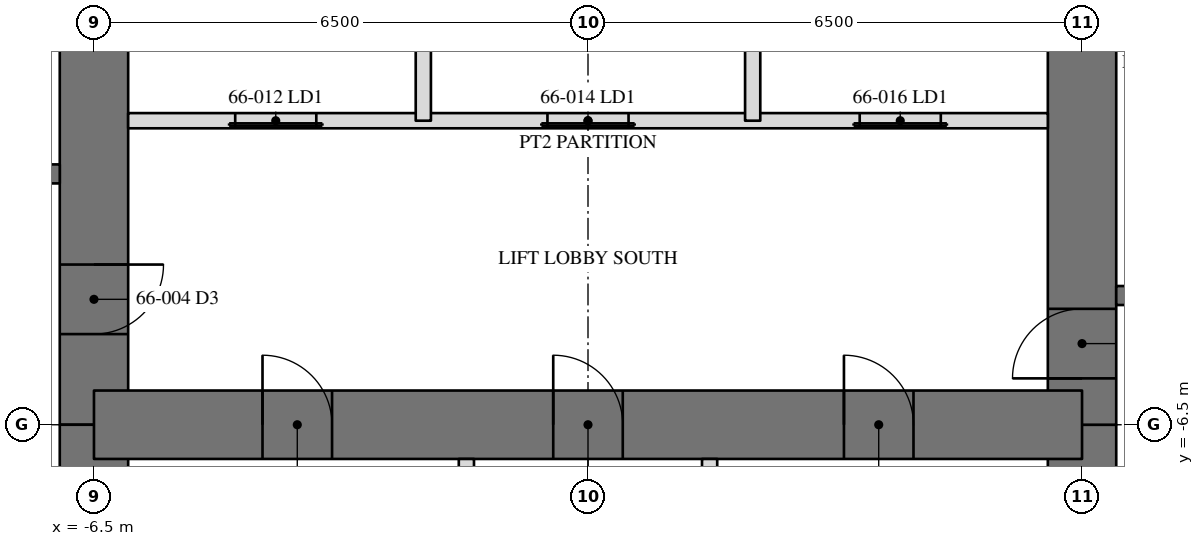
"""IFC4 building model, lengths in metres.
Left out: names, types, materials, properties, quantities, classifications, styles, units other than length and angle.
Written with IfcOpenShell. Run it as: python <this file> out.ifc"""

import sys

from ifc_helpers import new_model, si_unit, direction, frame, frame_2d, origin, place, context, subcontext, project, spatial, rectangle, extrude, element, fill, save


model = new_model("IFC4")
c1 = context("Model", 3, precision=1e-05, world=origin(), true_north=direction((0.0, 1.0)))
c2 = subcontext(c1, "Body", "Model", "MODEL_VIEW")
j1 = project(units=[si_unit("LENGTHUNIT", "METRE"), si_unit("PLANEANGLEUNIT", "RADIAN")], contexts=[c1])
p1 = place(None, origin())
s1 = spatial("IfcSite", under=j1, at=p1, CompositionType="ELEMENT")
p2 = place(p1, origin())
s2 = spatial("IfcBuilding", under=s1, at=p2, CompositionType="ELEMENT")
p3 = place(p2, frame((0.0, 0.0, 270.4)))
s3 = spatial("IfcBuildingStorey", under=s2, at=p3, CompositionType="ELEMENT", Elevation=270.4)
p4 = place(p3, frame((6.5, -11.0, 0.0), z_axis=(0.0, 0.0, 1.0), x_axis=(0.0, 1.0, 0.0)))
e1 = element("IfcWall", 1, at=p4, inside=s3, PredefinedType="SHEAR", context=c2, shape_type="SweptSolid", body=[
    extrude(rectangle(XDim=4.5, YDim=0.9, at=frame_2d((2.25, 0.0))), origin(), (0.0, 0.0, 1.0), 3.6),
])
p5 = place(p3, frame((6.5, -6.5, 0.0), z_axis=(0.0, 0.0, 1.0), x_axis=(0.0, 1.0, 0.0)))
e2 = element("IfcWall", 2, at=p5, inside=s3, PredefinedType="SHEAR", context=c2, shape_type="SweptSolid", body=[
    extrude(rectangle(XDim=13.0, YDim=0.9, at=frame_2d((6.5, 0.0))), origin(), (0.0, 0.0, 1.0), 3.6),
])
p6 = place(p5, frame((10.893, 0.0, 0.0)))
e3 = element("IfcOpeningElement", 3, at=p6, cuts=e2, PredefinedType="OPENING", context=c2, shape_type="SweptSolid", body=[
    extrude(rectangle(XDim=0.915, YDim=2.134, at=frame_2d((0.458, 1.067))), frame((0.0, 0.46, 0.0), z_axis=(0.0, -1.0, 0.0), x_axis=(1.0, 0.0, 0.0)), (0.0, 0.0, 1.0), 0.92),
])
p7 = place(p5, frame((0.61, 0.0, 0.0)))
e4 = element("IfcOpeningElement", 4, at=p7, cuts=e2, PredefinedType="OPENING", context=c2, shape_type="SweptSolid", body=[
    extrude(rectangle(XDim=0.915, YDim=2.134, at=frame_2d((0.458, 1.067))), frame((0.0, 0.46, 0.0), z_axis=(0.0, -1.0, 0.0), x_axis=(1.0, 0.0, 0.0)), (0.0, 0.0, 1.0), 0.92),
])
p8 = place(p3, frame((-6.5, 6.5, 0.0), z_axis=(0.0, 0.0, 1.0), x_axis=(0.0, -1.0, 0.0)))
e5 = element("IfcWall", 5, at=p8, inside=s3, PredefinedType="SHEAR", context=c2, shape_type="SweptSolid", body=[
    extrude(rectangle(XDim=13.0, YDim=0.9, at=frame_2d((6.5, 0.0))), origin(), (0.0, 0.0, 1.0), 3.6),
])
p9 = place(p8, frame((10.893, 0.0, 0.0)))
e6 = element("IfcOpeningElement", 6, at=p9, cuts=e5, PredefinedType="OPENING", context=c2, shape_type="SweptSolid", body=[
    extrude(rectangle(XDim=0.915, YDim=2.134, at=frame_2d((0.458, 1.067))), frame((0.0, 0.46, 0.0), z_axis=(0.0, -1.0, 0.0), x_axis=(1.0, 0.0, 0.0)), (0.0, 0.0, 1.0), 0.92),
])
p10 = place(p8, frame((0.61, 0.0, 0.0)))
e7 = element("IfcOpeningElement", 7, at=p10, cuts=e5, PredefinedType="OPENING", context=c2, shape_type="SweptSolid", body=[
    extrude(rectangle(XDim=0.915, YDim=2.134, at=frame_2d((0.458, 1.067))), frame((0.0, 0.46, 0.0), z_axis=(0.0, -1.0, 0.0), x_axis=(1.0, 0.0, 0.0)), (0.0, 0.0, 1.0), 0.92),
])
p11 = place(p3, frame((-6.5, -6.5, 0.0), z_axis=(0.0, 0.0, 1.0), x_axis=(0.0, -1.0, 0.0)))
e8 = element("IfcWall", 8, at=p11, inside=s3, PredefinedType="SHEAR", context=c2, shape_type="SweptSolid", body=[
    extrude(rectangle(XDim=4.5, YDim=0.9, at=frame_2d((2.25, 0.0))), origin(), (0.0, 0.0, 1.0), 3.6),
])
p12 = place(p3, frame((-6.5, -6.5, 0.0), z_axis=(0.0, 0.0, 1.0), x_axis=(1.0, 0.0, 0.0)))
e9 = element("IfcWall", 9, at=p12, inside=s3, PredefinedType="SHEAR", context=c2, shape_type="SweptSolid", body=[
    extrude(rectangle(XDim=13.0, YDim=0.9, at=frame_2d((6.5, 0.0))), origin(), (0.0, 0.0, 1.0), 3.6),
])
p13 = place(p12, frame((6.042, 0.0, 0.0)))
e10 = element("IfcOpeningElement", 10, at=p13, cuts=e9, PredefinedType="OPENING", context=c2, shape_type="SweptSolid", body=[
    extrude(rectangle(XDim=0.915, YDim=2.134, at=frame_2d((0.458, 1.067))), frame((0.0, 0.46, 0.0), z_axis=(0.0, -1.0, 0.0), x_axis=(1.0, 0.0, 0.0)), (0.0, 0.0, 1.0), 0.92),
])
p14 = place(p12, frame((2.218, 0.0, 0.0)))
e11 = element("IfcOpeningElement", 11, at=p14, cuts=e9, PredefinedType="OPENING", context=c2, shape_type="SweptSolid", body=[
    extrude(rectangle(XDim=0.915, YDim=2.134, at=frame_2d((0.458, 1.067))), frame((0.0, 0.46, 0.0), z_axis=(0.0, -1.0, 0.0), x_axis=(1.0, 0.0, 0.0)), (0.0, 0.0, 1.0), 0.92),
])
p15 = place(p12, frame((9.867, 0.0, 0.0)))
e12 = element("IfcOpeningElement", 12, at=p15, cuts=e9, PredefinedType="OPENING", context=c2, shape_type="SweptSolid", body=[
    extrude(rectangle(XDim=0.915, YDim=2.134, at=frame_2d((0.458, 1.067))), frame((0.0, 0.46, 0.0), z_axis=(0.0, -1.0, 0.0), x_axis=(1.0, 0.0, 0.0)), (0.0, 0.0, 1.0), 0.92),
])
p16 = place(p3, frame((6.95, -4.8, 0.0), z_axis=(0.0, 0.0, 1.0), x_axis=(1.0, 0.0, 0.0)))
e13 = element("IfcWall", 13, at=p16, inside=s3, PredefinedType="SOLIDWALL", context=c2, shape_type="SweptSolid", body=[
    extrude(rectangle(XDim=3.75, YDim=0.25, at=frame_2d((1.875, 0.0))), origin(), (0.0, 0.0, 1.0), 3.41),
])
p17 = place(p3, frame((-6.95, -3.2, 0.0), z_axis=(0.0, 0.0, 1.0), x_axis=(-1.0, 0.0, 0.0)))
e14 = element("IfcWall", 14, at=p17, inside=s3, PredefinedType="SOLIDWALL", context=c2, shape_type="SweptSolid", body=[
    extrude(rectangle(XDim=3.75, YDim=0.25, at=frame_2d((1.875, 0.0))), origin(), (0.0, 0.0, 1.0), 3.41),
])
p18 = place(p17, frame((1.342, 0.0, 0.0)))
e15 = element("IfcOpeningElement", 15, at=p18, cuts=e14, PredefinedType="OPENING", context=c2, shape_type="SweptSolid", body=[
    extrude(rectangle(XDim=1.067, YDim=2.134, at=frame_2d((0.533, 1.067))), frame((0.0, 0.135, 0.0), z_axis=(0.0, -1.0, 0.0), x_axis=(1.0, 0.0, 0.0)), (0.0, 0.0, 1.0), 0.27),
])
p19 = place(p3, frame((6.05, -2.5, 0.0), z_axis=(0.0, 0.0, 1.0), x_axis=(-1.0, 0.0, 0.0)))
e16 = element("IfcWall", 16, at=p19, inside=s3, PredefinedType="PARTITIONING", context=c2, shape_type="SweptSolid", body=[
    extrude(rectangle(XDim=12.1, YDim=0.2, at=frame_2d((6.05, 0.0))), origin(), (0.0, 0.0, 1.0), 3.41),
])
p20 = place(p19, frame((9.625, 0.0, 0.0)))
e17 = element("IfcOpeningElement", 17, at=p20, cuts=e16, PredefinedType="OPENING", context=c2, shape_type="SweptSolid", body=[
    extrude(rectangle(XDim=1.067, YDim=2.134, at=frame_2d((0.533, 1.067))), frame((0.0, 0.11, 0.0), z_axis=(0.0, -1.0, 0.0), x_axis=(1.0, 0.0, 0.0)), (0.0, 0.0, 1.0), 0.22),
])
p21 = place(p19, frame((5.517, 0.0, 0.0)))
e18 = element("IfcOpeningElement", 18, at=p21, cuts=e16, PredefinedType="OPENING", context=c2, shape_type="SweptSolid", body=[
    extrude(rectangle(XDim=1.067, YDim=2.134, at=frame_2d((0.533, 1.067))), frame((0.0, 0.11, 0.0), z_axis=(0.0, -1.0, 0.0), x_axis=(1.0, 0.0, 0.0)), (0.0, 0.0, 1.0), 0.22),
])
p22 = place(p19, frame((1.408, 0.0, 0.0)))
e19 = element("IfcOpeningElement", 19, at=p22, cuts=e16, PredefinedType="OPENING", context=c2, shape_type="SweptSolid", body=[
    extrude(rectangle(XDim=1.067, YDim=2.134, at=frame_2d((0.533, 1.067))), frame((0.0, 0.11, 0.0), z_axis=(0.0, -1.0, 0.0), x_axis=(1.0, 0.0, 0.0)), (0.0, 0.0, 1.0), 0.22),
])
for number, where, z_axis, x_axis in (
    (20, (-2.167, -2.5, 0.0), (0.0, 0.0, 1.0), (0.0, 1.0, 0.0)),
    (21, (2.167, -2.5, 0.0), (0.0, 0.0, 1.0), (0.0, 1.0, 0.0)),
):
    element("IfcWall", number, at=place(p3, frame(where, z_axis=z_axis, x_axis=x_axis)), inside=s3, PredefinedType="PARTITIONING", context=c2, shape_type="SweptSolid", body=[
        extrude(rectangle(XDim=5.0, YDim=0.2, at=frame_2d((2.5, 0.0))), origin(), (0.0, 0.0, 1.0), 3.41),
    ])
for number, where, z_axis, x_axis in (
    (22, (-1.6, -6.95, 0.0), (0.0, 0.0, 1.0), (0.0, -1.0, 0.0)),
    (23, (1.6, -6.95, 0.0), (0.0, 0.0, 1.0), (0.0, -1.0, 0.0)),
):
    element("IfcWall", number, at=place(p3, frame(where, z_axis=z_axis, x_axis=x_axis)), inside=s3, PredefinedType="PARTITIONING", context=c2, shape_type="SweptSolid", body=[
        extrude(rectangle(XDim=3.75, YDim=0.2, at=frame_2d((1.875, 0.0))), origin(), (0.0, 0.0, 1.0), 3.41),
    ])
p23 = place(p9, origin())
e24 = element("IfcDoor", 24, at=p23, inside=s3, OperationType="SINGLE_SWING_RIGHT", PredefinedType="DOOR", context=c2, shape_type="SweptSolid", body=[
    extrude(rectangle(XDim=0.915, YDim=2.134, at=frame_2d((0.458, 1.067))), frame((0.0, -0.375, 0.0), z_axis=(0.0, -1.0, 0.0), x_axis=(1.0, 0.0, 0.0)), (0.0, 0.0, 1.0), 0.05),
])
fill(e6, e24)
p24 = place(p7, origin())
e25 = element("IfcDoor", 25, at=p24, inside=s3, OperationType="SINGLE_SWING_RIGHT", PredefinedType="DOOR", context=c2, shape_type="SweptSolid", body=[
    extrude(rectangle(XDim=0.915, YDim=2.134, at=frame_2d((0.458, 1.067))), frame((0.0, -0.375, 0.0), z_axis=(0.0, -1.0, 0.0), x_axis=(1.0, 0.0, 0.0)), (0.0, 0.0, 1.0), 0.05),
])
fill(e4, e25)
p25 = place(p20, origin())
e26 = element("IfcDoor", 26, at=p25, inside=s3, OperationType="SLIDING_TO_LEFT", PredefinedType="DOOR", context=c2, shape_type="SweptSolid", body=[
    extrude(rectangle(XDim=1.067, YDim=2.134, at=frame_2d((0.533, 1.067))), frame((0.0, 0.025, 0.0), z_axis=(0.0, -1.0, 0.0), x_axis=(1.0, 0.0, 0.0)), (0.0, 0.0, 1.0), 0.05),
])
fill(e17, e26)
p26 = place(p21, origin())
e27 = element("IfcDoor", 27, at=p26, inside=s3, OperationType="SLIDING_TO_LEFT", PredefinedType="DOOR", context=c2, shape_type="SweptSolid", body=[
    extrude(rectangle(XDim=1.067, YDim=2.134, at=frame_2d((0.533, 1.067))), frame((0.0, 0.025, 0.0), z_axis=(0.0, -1.0, 0.0), x_axis=(1.0, 0.0, 0.0)), (0.0, 0.0, 1.0), 0.05),
])
fill(e18, e27)
p27 = place(p22, origin())
e28 = element("IfcDoor", 28, at=p27, inside=s3, OperationType="SLIDING_TO_LEFT", PredefinedType="DOOR", context=c2, shape_type="SweptSolid", body=[
    extrude(rectangle(XDim=1.067, YDim=2.134, at=frame_2d((0.533, 1.067))), frame((0.0, 0.025, 0.0), z_axis=(0.0, -1.0, 0.0), x_axis=(1.0, 0.0, 0.0)), (0.0, 0.0, 1.0), 0.05),
])
fill(e19, e28)
p28 = place(p13, origin())
e29 = element("IfcDoor", 29, at=p28, inside=s3, OperationType="SINGLE_SWING_RIGHT", PredefinedType="DOOR", context=c2, shape_type="SweptSolid", body=[
    extrude(rectangle(XDim=0.915, YDim=2.134, at=frame_2d((0.458, 1.067))), frame((0.0, -0.375, 0.0), z_axis=(0.0, -1.0, 0.0), x_axis=(1.0, 0.0, 0.0)), (0.0, 0.0, 1.0), 0.05),
])
fill(e10, e29)
p29 = place(p14, origin())
e30 = element("IfcDoor", 30, at=p29, inside=s3, OperationType="SINGLE_SWING_RIGHT", PredefinedType="DOOR", context=c2, shape_type="SweptSolid", body=[
    extrude(rectangle(XDim=0.915, YDim=2.134, at=frame_2d((0.458, 1.067))), frame((0.0, -0.375, 0.0), z_axis=(0.0, -1.0, 0.0), x_axis=(1.0, 0.0, 0.0)), (0.0, 0.0, 1.0), 0.05),
])
fill(e11, e30)
p30 = place(p15, origin())
e31 = element("IfcDoor", 31, at=p30, inside=s3, OperationType="SINGLE_SWING_RIGHT", PredefinedType="DOOR", context=c2, shape_type="SweptSolid", body=[
    extrude(rectangle(XDim=0.915, YDim=2.134, at=frame_2d((0.458, 1.067))), frame((0.0, -0.375, 0.0), z_axis=(0.0, -1.0, 0.0), x_axis=(1.0, 0.0, 0.0)), (0.0, 0.0, 1.0), 0.05),
])
fill(e12, e31)
save(model, sys.argv[1])
